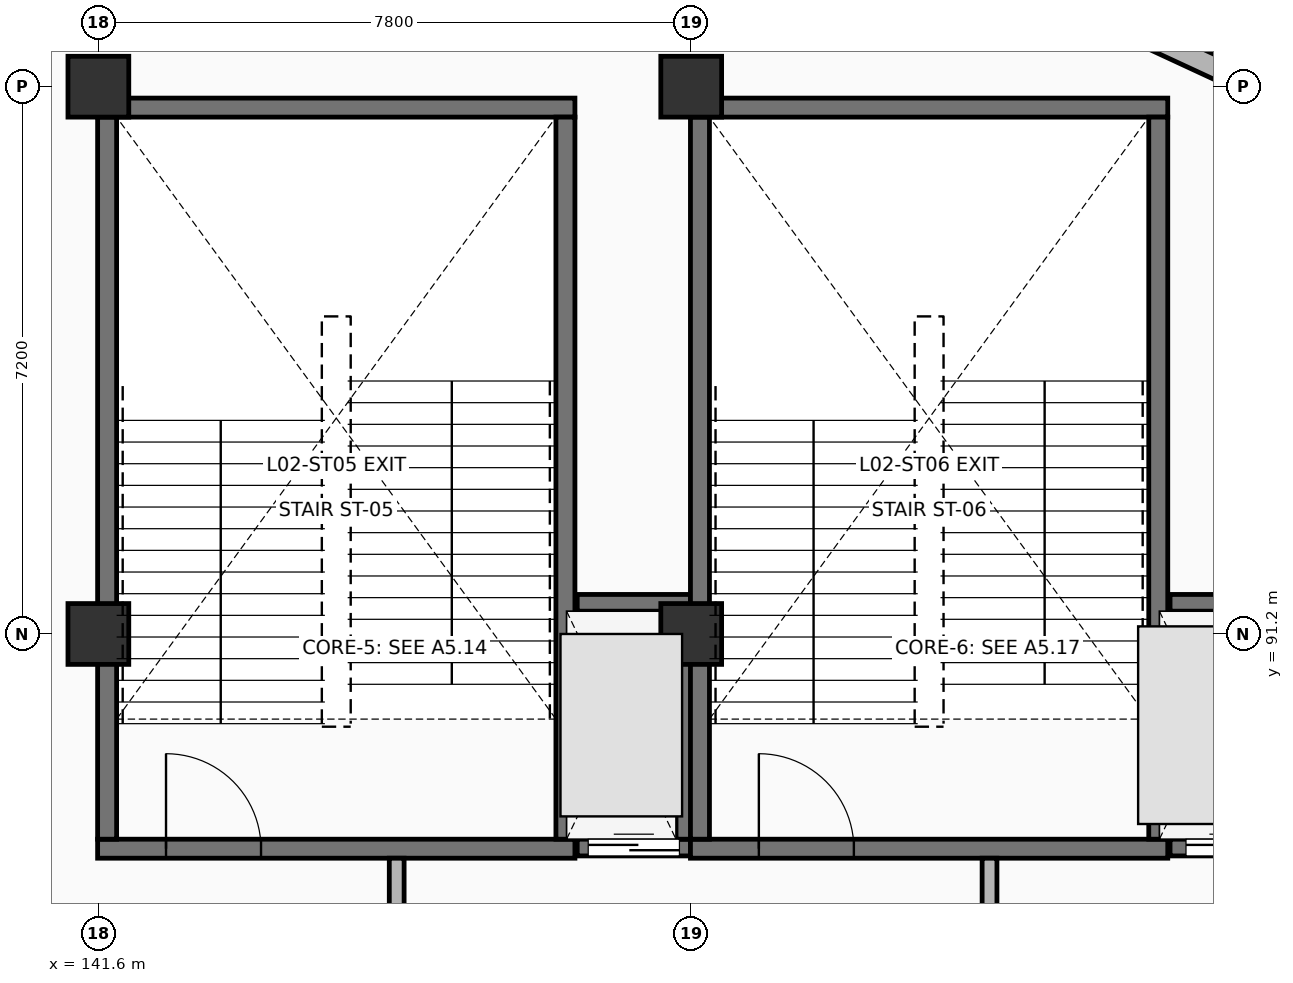
"""IFC4 building model, lengths in metres.
Left out: names, types, materials, properties, quantities, classifications, styles, units other than length and angle.
Written with IfcOpenShell. Run it as: python <this file> out.ifc"""

import sys

from ifc_helpers import new_model, si_unit, direction, frame, frame_2d, origin, origin_2d, place, context, subcontext, project, spatial, rectangle, extrude, element, fill, save


model = new_model("IFC4")
c1 = context("Model", 3, precision=1e-05, world=origin(), true_north=direction((0.0, 1.0)))
c2 = subcontext(c1, "Body", "Model", "MODEL_VIEW")
j1 = project(units=[si_unit("LENGTHUNIT", "METRE"), si_unit("PLANEANGLEUNIT", "RADIAN")], contexts=[c1])
p1 = place(None, origin())
s1 = spatial("IfcSite", under=j1, at=p1, CompositionType="ELEMENT")
p2 = place(p1, origin())
s2 = spatial("IfcBuilding", under=s1, at=p2, CompositionType="ELEMENT")
p3 = place(p2, frame((0.0, 0.0, 5.4)))
s3 = spatial("IfcBuildingStorey", under=s2, at=p3, CompositionType="ELEMENT", Elevation=5.4)
for number, where, z_axis, x_axis in (
    (1, (141.6, 91.2, 0.0), (0.0, 0.0, 1.0), (1.0, 0.0, 0.0)),
    (2, (141.6, 98.4, 0.0), (0.0, 0.0, 1.0), (1.0, 0.0, 0.0)),
    (3, (149.4, 91.2, 0.0), (0.0, 0.0, 1.0), (1.0, 0.0, 0.0)),
    (4, (149.4, 98.4, 0.0), (0.0, 0.0, 1.0), (1.0, 0.0, 0.0)),
):
    element("IfcColumn", number, at=place(p3, frame(where, z_axis=z_axis, x_axis=x_axis)), inside=s3, PredefinedType="COLUMN", context=c2, shape_type="SweptSolid", body=[
        extrude(rectangle(XDim=0.8, YDim=0.8, at=origin_2d()), origin(), (0.0, 0.0, 1.0), 5.1),
    ])
p4 = place(p3, frame((150.219, 101.472, 0.0), z_axis=(0.0, 0.0, 1.0), x_axis=(0.90720513909, -0.420688525644, 0.0)))
e5 = element("IfcWall", 5, at=p4, inside=s3, PredefinedType="SOLIDWALL", context=c2, shape_type="SweptSolid", body=[
    extrude(rectangle(XDim=7.11, YDim=0.3, at=frame_2d((3.555, 0.0))), origin(), (0.0, 0.0, 1.0), 4.82),
])
p5 = place(p3, frame((141.59, 88.375, 0.0), z_axis=(0.0, 0.0, 1.0), x_axis=(1.0, 0.0, 0.0)))
e6 = element("IfcWall", 6, at=p5, inside=s3, PredefinedType="SHEAR", context=c2, shape_type="SweptSolid", body=[
    extrude(rectangle(XDim=6.28, YDim=0.25, at=frame_2d((3.14, 0.0))), origin(), (0.0, 0.0, 1.0), 4.82),
])
p6 = place(p5, frame((0.9, 0.0, 0.0)))
e7 = element("IfcOpeningElement", 7, at=p6, cuts=e6, PredefinedType="OPENING", context=c2, shape_type="SweptSolid", body=[
    extrude(rectangle(XDim=1.25, YDim=2.2, at=frame_2d((0.625, 1.1))), frame((0.0, 0.135, 0.0), z_axis=(0.0, -1.0, 0.0), x_axis=(1.0, 0.0, 0.0)), (0.0, 0.0, 1.0), 0.27),
])
p7 = place(p3, frame((141.59, 98.125, 0.0), z_axis=(0.0, 0.0, 1.0), x_axis=(1.0, 0.0, 0.0)))
e8 = element("IfcWall", 8, at=p7, inside=s3, PredefinedType="SHEAR", context=c2, shape_type="SweptSolid", body=[
    extrude(rectangle(XDim=6.28, YDim=0.25, at=frame_2d((3.14, 0.0))), origin(), (0.0, 0.0, 1.0), 4.82),
])
for number, where, z_axis, x_axis in (
    (9, (141.715, 88.5, 0.0), (0.0, 0.0, 1.0), (0.0, 1.0, 0.0)),
    (10, (147.745, 88.5, 0.0), (0.0, 0.0, 1.0), (0.0, 1.0, 0.0)),
):
    element("IfcWall", number, at=place(p3, frame(where, z_axis=z_axis, x_axis=x_axis)), inside=s3, PredefinedType="SHEAR", context=c2, shape_type="SweptSolid", body=[
        extrude(rectangle(XDim=9.5, YDim=0.25, at=frame_2d((4.75, 0.0))), origin(), (0.0, 0.0, 1.0), 4.82),
    ])
p8 = place(p3, frame((147.9, 88.39, 0.0), z_axis=(0.0, 0.0, 1.0), x_axis=(1.0, 0.0, 0.0)))
e11 = element("IfcWall", 11, at=p8, inside=s3, PredefinedType="SHEAR", context=c2, shape_type="SweptSolid", body=[
    extrude(rectangle(XDim=1.49, YDim=0.22, at=frame_2d((0.745, 0.0))), origin(), (0.0, 0.0, 1.0), 4.82),
])
p9 = place(p8, frame((0.145, 0.0, 0.0)))
e12 = element("IfcOpeningElement", 12, at=p9, cuts=e11, PredefinedType="OPENING", context=c2, shape_type="SweptSolid", body=[
    extrude(rectangle(XDim=1.2, YDim=2.2, at=frame_2d((0.6, 1.1))), frame((0.0, 0.12, 0.0), z_axis=(0.0, -1.0, 0.0), x_axis=(1.0, 0.0, 0.0)), (0.0, 0.0, 1.0), 0.24),
])
p10 = place(p3, frame((147.9, 91.61, 0.0), z_axis=(0.0, 0.0, 1.0), x_axis=(1.0, 0.0, 0.0)))
e13 = element("IfcWall", 13, at=p10, inside=s3, PredefinedType="SHEAR", context=c2, shape_type="SweptSolid", body=[
    extrude(rectangle(XDim=1.49, YDim=0.22, at=frame_2d((0.745, 0.0))), origin(), (0.0, 0.0, 1.0), 4.82),
])
p11 = place(p3, frame((149.31, 88.5, 0.0), z_axis=(0.0, 0.0, 1.0), x_axis=(0.0, 1.0, 0.0)))
e14 = element("IfcWall", 14, at=p11, inside=s3, PredefinedType="SHEAR", context=c2, shape_type="SweptSolid", body=[
    extrude(rectangle(XDim=3.0, YDim=0.22, at=frame_2d((1.5, 0.0))), origin(), (0.0, 0.0, 1.0), 4.82),
])
p12 = place(p3, frame((145.525, 84.15, 0.0), z_axis=(0.0, 0.0, 1.0), x_axis=(0.0, 1.0, 0.0)))
e15 = element("IfcWall", 15, at=p12, inside=s3, PredefinedType="PARTITIONING", context=c2, shape_type="SweptSolid", body=[
    extrude(rectangle(XDim=4.1, YDim=0.195, at=frame_2d((2.05, 0.0))), origin(), (0.0, 0.0, 1.0), 4.82),
])
p13 = place(p12, frame((1.5, 0.0, 0.0)))
e16 = element("IfcOpeningElement", 16, at=p13, cuts=e15, PredefinedType="OPENING", context=c2, shape_type="SweptSolid", body=[
    extrude(rectangle(XDim=1.1, YDim=2.15, at=frame_2d((0.55, 1.075))), frame((0.0, 0.107, 0.0), z_axis=(0.0, -1.0, 0.0), x_axis=(1.0, 0.0, 0.0)), (0.0, 0.0, 1.0), 0.215),
])
p14 = place(p3, frame((149.39, 88.375, 0.0), z_axis=(0.0, 0.0, 1.0), x_axis=(1.0, 0.0, 0.0)))
e17 = element("IfcWall", 17, at=p14, inside=s3, PredefinedType="SHEAR", context=c2, shape_type="SweptSolid", body=[
    extrude(rectangle(XDim=6.28, YDim=0.25, at=frame_2d((3.14, 0.0))), origin(), (0.0, 0.0, 1.0), 4.82),
])
p15 = place(p14, frame((0.9, 0.0, 0.0)))
e18 = element("IfcOpeningElement", 18, at=p15, cuts=e17, PredefinedType="OPENING", context=c2, shape_type="SweptSolid", body=[
    extrude(rectangle(XDim=1.25, YDim=2.2, at=frame_2d((0.625, 1.1))), frame((0.0, 0.135, 0.0), z_axis=(0.0, -1.0, 0.0), x_axis=(1.0, 0.0, 0.0)), (0.0, 0.0, 1.0), 0.27),
])
p16 = place(p3, frame((149.39, 98.125, 0.0), z_axis=(0.0, 0.0, 1.0), x_axis=(1.0, 0.0, 0.0)))
e19 = element("IfcWall", 19, at=p16, inside=s3, PredefinedType="SHEAR", context=c2, shape_type="SweptSolid", body=[
    extrude(rectangle(XDim=6.28, YDim=0.25, at=frame_2d((3.14, 0.0))), origin(), (0.0, 0.0, 1.0), 4.82),
])
for number, where, z_axis, x_axis in (
    (20, (149.515, 88.5, 0.0), (0.0, 0.0, 1.0), (0.0, 1.0, 0.0)),
    (21, (155.545, 88.5, 0.0), (0.0, 0.0, 1.0), (0.0, 1.0, 0.0)),
):
    element("IfcWall", number, at=place(p3, frame(where, z_axis=z_axis, x_axis=x_axis)), inside=s3, PredefinedType="SHEAR", context=c2, shape_type="SweptSolid", body=[
        extrude(rectangle(XDim=9.5, YDim=0.25, at=frame_2d((4.75, 0.0))), origin(), (0.0, 0.0, 1.0), 4.82),
    ])
p17 = place(p3, frame((155.7, 88.39, 0.0), z_axis=(0.0, 0.0, 1.0), x_axis=(1.0, 0.0, 0.0)))
e22 = element("IfcWall", 22, at=p17, inside=s3, PredefinedType="SHEAR", context=c2, shape_type="SweptSolid", body=[
    extrude(rectangle(XDim=1.52, YDim=0.22, at=frame_2d((0.76, 0.0))), origin(), (0.0, 0.0, 1.0), 4.82),
])
p18 = place(p17, frame((0.21, 0.0, 0.0)))
e23 = element("IfcOpeningElement", 23, at=p18, cuts=e22, PredefinedType="OPENING", context=c2, shape_type="SweptSolid", body=[
    extrude(rectangle(XDim=1.1, YDim=2.15, at=frame_2d((0.55, 1.075))), frame((0.0, 0.12, 0.0), z_axis=(0.0, -1.0, 0.0), x_axis=(1.0, 0.0, 0.0)), (0.0, 0.0, 1.0), 0.24),
])
p19 = place(p3, frame((155.7, 91.61, 0.0), z_axis=(0.0, 0.0, 1.0), x_axis=(1.0, 0.0, 0.0)))
e24 = element("IfcWall", 24, at=p19, inside=s3, PredefinedType="SHEAR", context=c2, shape_type="SweptSolid", body=[
    extrude(rectangle(XDim=1.52, YDim=0.22, at=frame_2d((0.76, 0.0))), origin(), (0.0, 0.0, 1.0), 4.82),
])
p20 = place(p3, frame((153.325, 84.15, 0.0), z_axis=(0.0, 0.0, 1.0), x_axis=(0.0, 1.0, 0.0)))
e25 = element("IfcWall", 25, at=p20, inside=s3, PredefinedType="PARTITIONING", context=c2, shape_type="SweptSolid", body=[
    extrude(rectangle(XDim=4.1, YDim=0.195, at=frame_2d((2.05, 0.0))), origin(), (0.0, 0.0, 1.0), 4.82),
])
p21 = place(p20, frame((1.5, 0.0, 0.0)))
e26 = element("IfcOpeningElement", 26, at=p21, cuts=e25, PredefinedType="OPENING", context=c2, shape_type="SweptSolid", body=[
    extrude(rectangle(XDim=1.1, YDim=2.15, at=frame_2d((0.55, 1.075))), frame((0.0, 0.107, 0.0), z_axis=(0.0, -1.0, 0.0), x_axis=(1.0, 0.0, 0.0)), (0.0, 0.0, 1.0), 0.215),
])
p22 = place(p6, origin())
e27 = element("IfcDoor", 27, at=p22, inside=s3, OperationType="SINGLE_SWING_LEFT", PredefinedType="DOOR", context=c2, shape_type="SweptSolid", body=[
    extrude(rectangle(XDim=1.25, YDim=2.2, at=frame_2d((0.625, 1.1))), frame((0.0, 0.025, 0.0), z_axis=(0.0, -1.0, 0.0), x_axis=(1.0, 0.0, 0.0)), (0.0, 0.0, 1.0), 0.05),
])
fill(e7, e27)
p23 = place(p9, origin())
e28 = element("IfcDoor", 28, at=p23, inside=s3, OperationType="DOUBLE_DOOR_SLIDING", PredefinedType="DOOR", context=c2, shape_type="SweptSolid", body=[
    extrude(rectangle(XDim=1.2, YDim=2.2, at=frame_2d((0.6, 1.1))), frame((0.0, 0.025, 0.0), z_axis=(0.0, -1.0, 0.0), x_axis=(1.0, 0.0, 0.0)), (0.0, 0.0, 1.0), 0.05),
])
fill(e12, e28)
p24 = place(p15, origin())
e29 = element("IfcDoor", 29, at=p24, inside=s3, OperationType="SINGLE_SWING_LEFT", PredefinedType="DOOR", context=c2, shape_type="SweptSolid", body=[
    extrude(rectangle(XDim=1.25, YDim=2.2, at=frame_2d((0.625, 1.1))), frame((0.0, 0.025, 0.0), z_axis=(0.0, -1.0, 0.0), x_axis=(1.0, 0.0, 0.0)), (0.0, 0.0, 1.0), 0.05),
])
fill(e18, e29)
p25 = place(p18, origin())
e30 = element("IfcDoor", 30, at=p25, inside=s3, OperationType="DOUBLE_DOOR_SLIDING", PredefinedType="DOOR", context=c2, shape_type="SweptSolid", body=[
    extrude(rectangle(XDim=1.1, YDim=2.15, at=frame_2d((0.55, 1.075))), frame((0.0, 0.025, 0.0), z_axis=(0.0, -1.0, 0.0), x_axis=(1.0, 0.0, 0.0)), (0.0, 0.0, 1.0), 0.05),
])
fill(e23, e30)
save(model, sys.argv[1])
